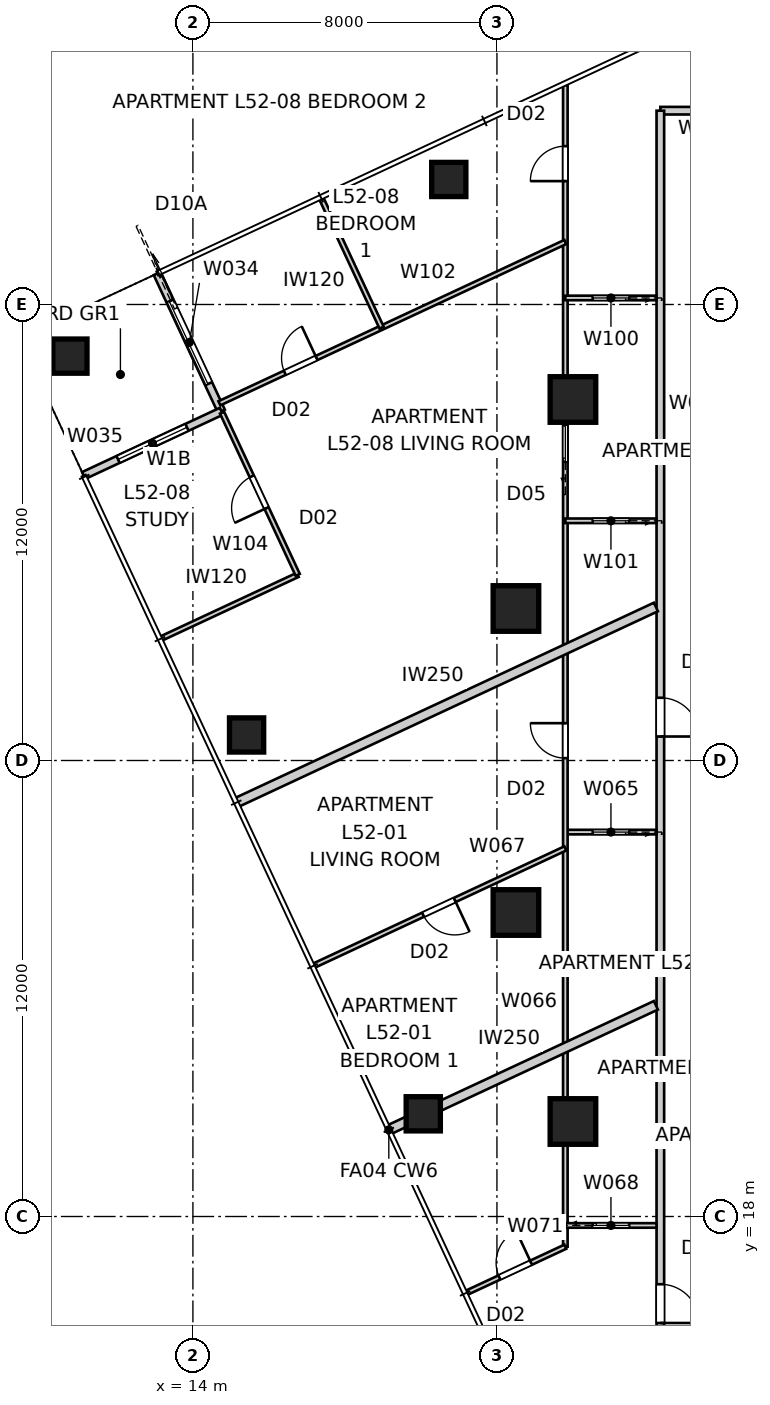
"""IFC4 building model, lengths in metres.
Left out: names, types, materials, properties, quantities, classifications, styles, units other than length and angle.
Written with IfcOpenShell. Run it as: python <this file> out.ifc"""

import sys

from ifc_helpers import new_model, si_unit, direction, frame, frame_2d, origin, origin_2d, place, context, subcontext, project, spatial, rectangle, extrude, element, fill, save


model = new_model("IFC4")
c1 = context("Model", 3, precision=1e-05, world=origin(), true_north=direction((0.0, 1.0)))
c2 = subcontext(c1, "Body", "Model", "MODEL_VIEW")
j1 = project(units=[si_unit("LENGTHUNIT", "METRE"), si_unit("PLANEANGLEUNIT", "RADIAN")], contexts=[c1])
p1 = place(None, origin())
s1 = spatial("IfcSite", under=j1, at=p1, CompositionType="ELEMENT")
p2 = place(p1, origin())
s2 = spatial("IfcBuilding", under=s1, at=p2, CompositionType="ELEMENT")
p3 = place(p2, frame((0.0, 0.0, 189.6)))
s3 = spatial("IfcBuildingStorey", under=s2, at=p3, CompositionType="ELEMENT", Elevation=189.6)
for number, where, z_axis, x_axis in (
    (1, (20.733, 45.29, 0.0), (0.0, 0.0, 1.0), (1.0, 0.0, 0.0)),
    (2, (10.764, 40.641, 0.0), (0.0, 0.0, 1.0), (1.0, 0.0, 0.0)),
    (3, (15.412, 30.672, 0.0), (0.0, 0.0, 1.0), (1.0, 0.0, 0.0)),
    (4, (20.061, 20.702, 0.0), (0.0, 0.0, 1.0), (1.0, 0.0, 0.0)),
):
    element("IfcColumn", number, at=place(p3, frame(where, z_axis=z_axis, x_axis=x_axis)), inside=s3, PredefinedType="COLUMN", context=c2, shape_type="SweptSolid", body=[
        extrude(rectangle(XDim=0.9, YDim=0.9, at=origin_2d()), origin(), (0.0, 0.0, 1.0), 3.4),
    ])
for number, where, z_axis, x_axis in (
    (5, (24.0, 39.5, 0.0), (0.0, 0.0, 1.0), (1.0, 0.0, 0.0)),
    (6, (22.5, 34.0, 0.0), (0.0, 0.0, 1.0), (1.0, 0.0, 0.0)),
    (7, (22.5, 26.0, 0.0), (0.0, 0.0, 1.0), (1.0, 0.0, 0.0)),
    (8, (24.0, 20.5, 0.0), (0.0, 0.0, 1.0), (1.0, 0.0, 0.0)),
):
    element("IfcColumn", number, at=place(p3, frame(where, z_axis=z_axis, x_axis=x_axis)), inside=s3, PredefinedType="COLUMN", context=c2, shape_type="SweptSolid", body=[
        extrude(rectangle(XDim=1.2, YDim=1.2, at=origin_2d()), origin(), (0.0, 0.0, 1.0), 3.4),
    ])
p4 = place(p3, frame((13.06, 42.815, 0.0), z_axis=(0.0, 0.0, 1.0), x_axis=(0.422658246362, -0.906289140828, 0.0)))
e9 = element("IfcWall", 9, at=p4, inside=s3, PredefinedType="SOLIDWALL", context=c2, shape_type="SweptSolid", body=[
    extrude(rectangle(XDim=4.0, YDim=0.2, at=frame_2d((2.0, 0.0))), origin(), (0.0, 0.0, 1.0), 3.25),
])
p5 = place(p4, frame((0.8, 0.0, 0.0)))
e10 = element("IfcOpeningElement", 10, at=p5, cuts=e9, PredefinedType="OPENING", context=c2, shape_type="SweptSolid", body=[
    extrude(rectangle(XDim=2.4, YDim=2.1, at=frame_2d((1.2, 1.05))), frame((0.0, 0.11, 0.0), z_axis=(0.0, -1.0, 0.0), x_axis=(1.0, 0.0, 0.0)), (0.0, 0.0, 1.0), 0.22),
])
p6 = place(p3, frame((14.75, 39.19, 0.0), z_axis=(0.0, 0.0, 1.0), x_axis=(-0.906289140828, -0.422658246362, 0.0)))
e11 = element("IfcWall", 11, at=p6, inside=s3, PredefinedType="SOLIDWALL", context=c2, shape_type="SweptSolid", body=[
    extrude(rectangle(XDim=4.0, YDim=0.2, at=frame_2d((2.0, 0.0))), origin(), (0.0, 0.0, 1.0), 3.25),
])
p7 = place(p6, frame((1.0, 0.0, 0.45)))
e12 = element("IfcOpeningElement", 12, at=p7, cuts=e11, PredefinedType="OPENING", context=c2, shape_type="SweptSolid", body=[
    extrude(rectangle(XDim=2.0, YDim=1.8, at=frame_2d((1.0, 0.9))), frame((0.0, 0.11, 0.0), z_axis=(0.0, -1.0, 0.0), x_axis=(1.0, 0.0, 0.0)), (0.0, 0.0, 1.0), 0.22),
])
p8 = place(p3, frame((33.692, 47.1, 0.0), z_axis=(0.0, 0.0, 1.0), x_axis=(-1.0, 0.0, 0.0)))
e13 = element("IfcWall", 13, at=p8, inside=s3, PredefinedType="PARTITIONING", context=c2, shape_type="SweptSolid", body=[
    extrude(rectangle(XDim=7.392, YDim=0.2, at=frame_2d((3.696, 0.0))), origin(), (0.0, 0.0, 1.0), 3.25),
])
p9 = place(p8, frame((3.957, 0.0, 0.0)))
e14 = element("IfcOpeningElement", 14, at=p9, cuts=e13, PredefinedType="OPENING", context=c2, shape_type="SweptSolid", body=[
    extrude(rectangle(XDim=1.02, YDim=2.34, at=frame_2d((0.51, 1.17))), frame((0.0, 0.11, 0.0), z_axis=(0.0, -1.0, 0.0), x_axis=(1.0, 0.0, 0.0)), (0.0, 0.0, 1.0), 0.22),
])
p10 = place(p3, frame((26.3, 47.1, 0.0), z_axis=(0.0, 0.0, 1.0), x_axis=(0.0, -1.0, 0.0)))
e15 = element("IfcWall", 15, at=p10, inside=s3, PredefinedType="PARTITIONING", context=c2, shape_type="SweptSolid", body=[
    extrude(rectangle(XDim=33.8, YDim=0.2, at=frame_2d((16.9, 0.0))), origin(), (0.0, 0.0, 1.0), 3.25),
])
p11 = place(p10, frame((15.449, 0.0, 0.0)))
e16 = element("IfcOpeningElement", 16, at=p11, cuts=e15, PredefinedType="OPENING", context=c2, shape_type="SweptSolid", body=[
    extrude(rectangle(XDim=1.02, YDim=2.34, at=frame_2d((0.51, 1.17))), frame((0.0, 0.11, 0.0), z_axis=(0.0, -1.0, 0.0), x_axis=(1.0, 0.0, 0.0)), (0.0, 0.0, 1.0), 0.22),
])
p12 = place(p10, frame((30.883, 0.0, 0.0)))
e17 = element("IfcOpeningElement", 17, at=p12, cuts=e15, PredefinedType="OPENING", context=c2, shape_type="SweptSolid", body=[
    extrude(rectangle(XDim=1.02, YDim=2.34, at=frame_2d((0.51, 1.17))), frame((0.0, 0.11, 0.0), z_axis=(0.0, -1.0, 0.0), x_axis=(1.0, 0.0, 0.0)), (0.0, 0.0, 1.0), 0.22),
])
p13 = place(p3, frame((19.155, 20.28, 0.0), z_axis=(0.0, 0.0, 1.0), x_axis=(0.906308569177, 0.422616584432, 0.0)))
e18 = element("IfcWall", 18, at=p13, inside=s3, PredefinedType="PARTITIONING", context=c2, shape_type="SweptSolid", body=[
    extrude(rectangle(XDim=7.755, YDim=0.25, at=frame_2d((3.877, 0.0))), origin(), (0.0, 0.0, 1.0), 3.25),
])
p14 = place(p3, frame((15.14, 28.89, 0.0), z_axis=(0.0, 0.0, 1.0), x_axis=(0.906303906082, 0.422626584374, 0.0)))
e19 = element("IfcWall", 19, at=p14, inside=s3, PredefinedType="PARTITIONING", context=c2, shape_type="SweptSolid", body=[
    extrude(rectangle(XDim=12.185, YDim=0.25, at=frame_2d((6.092, 0.0))), origin(), (0.0, 0.0, 1.0), 3.25),
])
p15 = place(p3, frame((26.2, 28.116, 0.0), z_axis=(0.0, 0.0, 1.0), x_axis=(-1.0, 0.0, 0.0)))
e20 = element("IfcWall", 20, at=p15, inside=s3, PredefinedType="PARTITIONING", context=c2, shape_type="SweptSolid", body=[
    extrude(rectangle(XDim=2.4, YDim=0.12, at=frame_2d((1.2, 0.0))), origin(), (0.0, 0.0, 1.0), 3.25),
])
p16 = place(p15, frame((0.72, 0.0, 0.0)))
e21 = element("IfcOpeningElement", 21, at=p16, cuts=e20, PredefinedType="OPENING", context=c2, shape_type="SweptSolid", body=[
    extrude(rectangle(XDim=0.96, YDim=2.1, at=frame_2d((0.48, 1.05))), frame((0.0, 0.07, 0.0), z_axis=(0.0, -1.0, 0.0), x_axis=(1.0, 0.0, 0.0)), (0.0, 0.0, 1.0), 0.14),
])
p17 = place(p3, frame((23.8, 17.205, 0.0), z_axis=(0.0, 0.0, 1.0), x_axis=(0.0, 1.0, 0.0)))
e22 = element("IfcWall", 22, at=p17, inside=s3, PredefinedType="PARTITIONING", context=c2, shape_type="SweptSolid", body=[
    extrude(rectangle(XDim=30.574, YDim=0.12, at=frame_2d((15.287, 0.0))), origin(), (0.0, 0.0, 1.0), 2.55),
])
p18 = place(p17, frame((12.857, 0.0, 0.0)))
e23 = element("IfcOpeningElement", 23, at=p18, cuts=e22, PredefinedType="OPENING", context=c2, shape_type="SweptSolid", body=[
    extrude(rectangle(XDim=0.92, YDim=2.34, at=frame_2d((0.46, 1.17))), frame((0.0, 0.07, 0.0), z_axis=(0.0, -1.0, 0.0), x_axis=(1.0, 0.0, 0.0)), (0.0, 0.0, 1.0), 0.14),
])
p19 = place(p17, frame((28.042, 0.0, 0.0)))
e24 = element("IfcOpeningElement", 24, at=p19, cuts=e22, PredefinedType="OPENING", context=c2, shape_type="SweptSolid", body=[
    extrude(rectangle(XDim=0.92, YDim=2.34, at=frame_2d((0.46, 1.17))), frame((0.0, 0.07, 0.0), z_axis=(0.0, -1.0, 0.0), x_axis=(1.0, 0.0, 0.0)), (0.0, 0.0, 1.0), 0.14),
])
p20 = place(p17, frame((20.655, 0.0, 0.0)))
e25 = element("IfcOpeningElement", 25, at=p20, cuts=e22, PredefinedType="OPENING", context=c2, shape_type="SweptSolid", body=[
    extrude(rectangle(XDim=0.96, YDim=2.1, at=frame_2d((0.48, 1.05))), frame((0.0, 0.07, 0.0), z_axis=(0.0, -1.0, 0.0), x_axis=(1.0, 0.0, 0.0)), (0.0, 0.0, 1.0), 0.14),
])
p21 = place(p3, frame((23.8, 27.687, 0.0), z_axis=(0.0, 0.0, 1.0), x_axis=(-0.906306986906, -0.422619977621, 0.0)))
e26 = element("IfcWall", 26, at=p21, inside=s3, PredefinedType="PARTITIONING", context=c2, shape_type="SweptSolid", body=[
    extrude(rectangle(XDim=7.3, YDim=0.12, at=frame_2d((3.65, 0.0))), origin(), (0.0, 0.0, 1.0), 3.25),
])
p22 = place(p21, frame((3.21, 0.0, 0.0)))
e27 = element("IfcOpeningElement", 27, at=p22, cuts=e26, PredefinedType="OPENING", context=c2, shape_type="SweptSolid", body=[
    extrude(rectangle(XDim=0.92, YDim=2.34, at=frame_2d((0.46, 1.17))), frame((0.0, 0.07, 0.0), z_axis=(0.0, -1.0, 0.0), x_axis=(1.0, 0.0, 0.0)), (0.0, 0.0, 1.0), 0.14),
])
p23 = place(p3, frame((23.8, 17.765, 0.0), z_axis=(0.0, 0.0, 1.0), x_axis=(1.0, 0.0, 0.0)))
e28 = element("IfcWall", 28, at=p23, inside=s3, PredefinedType="PARTITIONING", context=c2, shape_type="SweptSolid", body=[
    extrude(rectangle(XDim=2.4, YDim=0.12, at=frame_2d((1.2, 0.0))), origin(), (0.0, 0.0, 1.0), 3.25),
])
p24 = place(p23, frame((0.72, 0.0, 0.0)))
e29 = element("IfcOpeningElement", 29, at=p24, cuts=e28, PredefinedType="OPENING", context=c2, shape_type="SweptSolid", body=[
    extrude(rectangle(XDim=0.96, YDim=2.1, at=frame_2d((0.48, 1.05))), frame((0.0, 0.07, 0.0), z_axis=(0.0, -1.0, 0.0), x_axis=(1.0, 0.0, 0.0)), (0.0, 0.0, 1.0), 0.14),
])
p25 = place(p3, frame((21.199, 15.992, 0.0), z_axis=(0.0, 0.0, 1.0), x_axis=(0.906291760669, 0.422652628697, 0.0)))
e30 = element("IfcWall", 30, at=p25, inside=s3, PredefinedType="PARTITIONING", context=c2, shape_type="SweptSolid", body=[
    extrude(rectangle(XDim=2.87, YDim=0.12, at=frame_2d((1.435, 0.0))), origin(), (0.0, 0.0, 1.0), 3.25),
])
p26 = place(p25, frame((0.955, 0.0, 0.0)))
e31 = element("IfcOpeningElement", 31, at=p26, cuts=e30, PredefinedType="OPENING", context=c2, shape_type="SweptSolid", body=[
    extrude(rectangle(XDim=0.92, YDim=2.34, at=frame_2d((0.46, 1.17))), frame((0.0, 0.07, 0.0), z_axis=(0.0, -1.0, 0.0), x_axis=(1.0, 0.0, 0.0)), (0.0, 0.0, 1.0), 0.14),
])
p27 = place(p3, frame((26.2, 42.172, 0.0), z_axis=(0.0, 0.0, 1.0), x_axis=(-1.0, 0.0, 0.0)))
e32 = element("IfcWall", 32, at=p27, inside=s3, PredefinedType="PARTITIONING", context=c2, shape_type="SweptSolid", body=[
    extrude(rectangle(XDim=2.4, YDim=0.12, at=frame_2d((1.2, 0.0))), origin(), (0.0, 0.0, 1.0), 3.25),
])
p28 = place(p27, frame((0.72, 0.0, 0.0)))
e33 = element("IfcOpeningElement", 33, at=p28, cuts=e32, PredefinedType="OPENING", context=c2, shape_type="SweptSolid", body=[
    extrude(rectangle(XDim=0.96, YDim=2.1, at=frame_2d((0.48, 1.05))), frame((0.0, 0.07, 0.0), z_axis=(0.0, -1.0, 0.0), x_axis=(1.0, 0.0, 0.0)), (0.0, 0.0, 1.0), 0.14),
])
p29 = place(p3, frame((26.2, 36.308, 0.0), z_axis=(0.0, 0.0, 1.0), x_axis=(-1.0, 0.0, 0.0)))
e34 = element("IfcWall", 34, at=p29, inside=s3, PredefinedType="PARTITIONING", context=c2, shape_type="SweptSolid", body=[
    extrude(rectangle(XDim=2.4, YDim=0.12, at=frame_2d((1.2, 0.0))), origin(), (0.0, 0.0, 1.0), 3.25),
])
p30 = place(p29, frame((0.72, 0.0, 0.0)))
e35 = element("IfcOpeningElement", 35, at=p30, cuts=e34, PredefinedType="OPENING", context=c2, shape_type="SweptSolid", body=[
    extrude(rectangle(XDim=0.96, YDim=2.1, at=frame_2d((0.48, 1.05))), frame((0.0, 0.07, 0.0), z_axis=(0.0, -1.0, 0.0), x_axis=(1.0, 0.0, 0.0)), (0.0, 0.0, 1.0), 0.14),
])
p31 = place(p3, frame((14.697, 39.4, 0.0), z_axis=(0.0, 0.0, 1.0), x_axis=(0.906300466163, 0.422633961049, 0.0)))
e36 = element("IfcWall", 36, at=p31, inside=s3, PredefinedType="PARTITIONING", context=c2, shape_type="SweptSolid", body=[
    extrude(rectangle(XDim=10.044, YDim=0.12, at=frame_2d((5.022, 0.0))), origin(), (0.0, 0.0, 1.0), 3.25),
])
p32 = place(p31, frame((1.9, 0.0, 0.0)))
e37 = element("IfcOpeningElement", 37, at=p32, cuts=e36, PredefinedType="OPENING", context=c2, shape_type="SweptSolid", body=[
    extrude(rectangle(XDim=0.92, YDim=2.34, at=frame_2d((0.46, 1.17))), frame((0.0, 0.07, 0.0), z_axis=(0.0, -1.0, 0.0), x_axis=(1.0, 0.0, 0.0)), (0.0, 0.0, 1.0), 0.14),
])
p33 = place(p3, frame((13.169, 33.211, 0.0), z_axis=(0.0, 0.0, 1.0), x_axis=(0.906277619727, 0.422682949718, 0.0)))
e38 = element("IfcWall", 38, at=p33, inside=s3, PredefinedType="PARTITIONING", context=c2, shape_type="SweptSolid", body=[
    extrude(rectangle(XDim=3.96, YDim=0.12, at=frame_2d((1.98, 0.0))), origin(), (0.0, 0.0, 1.0), 3.25),
])
p34 = place(p3, frame((16.758, 34.885, 0.0), z_axis=(0.0, 0.0, 1.0), x_axis=(-0.422621536194, 0.906306260127, 0.0)))
e39 = element("IfcWall", 39, at=p34, inside=s3, PredefinedType="PARTITIONING", context=c2, shape_type="SweptSolid", body=[
    extrude(rectangle(XDim=4.71, YDim=0.12, at=frame_2d((2.355, 0.0))), origin(), (0.0, 0.0, 1.0), 3.25),
])
p35 = place(p34, frame((1.94, 0.0, 0.0)))
e40 = element("IfcOpeningElement", 40, at=p35, cuts=e39, PredefinedType="OPENING", context=c2, shape_type="SweptSolid", body=[
    extrude(rectangle(XDim=0.92, YDim=2.34, at=frame_2d((0.46, 1.17))), frame((0.0, 0.07, 0.0), z_axis=(0.0, -1.0, 0.0), x_axis=(1.0, 0.0, 0.0)), (0.0, 0.0, 1.0), 0.14),
])
p36 = place(p3, frame((18.965, 41.391, 0.0), z_axis=(0.0, 0.0, 1.0), x_axis=(-0.422600090785, 0.906316260071, 0.0)))
e41 = element("IfcWall", 41, at=p36, inside=s3, PredefinedType="PARTITIONING", context=c2, shape_type="SweptSolid", body=[
    extrude(rectangle(XDim=3.747, YDim=0.12, at=frame_2d((1.874, 0.0))), origin(), (0.0, 0.0, 1.0), 3.25),
])
p37 = place(p5, origin())
e42 = element("IfcDoor", 42, at=p37, inside=s3, OperationType="SLIDING_TO_LEFT", PredefinedType="DOOR", context=c2, shape_type="SweptSolid", body=[
    extrude(rectangle(XDim=2.4, YDim=2.1, at=frame_2d((1.2, 1.05))), frame((0.0, 0.025, 0.0), z_axis=(0.0, -1.0, 0.0), x_axis=(1.0, 0.0, 0.0)), (0.0, 0.0, 1.0), 0.05),
])
fill(e10, e42)
p38 = place(p7, origin())
e43 = element("IfcWindow", 43, at=p38, inside=s3, PartitioningType="SINGLE_PANEL", PredefinedType="WINDOW", context=c2, shape_type="SweptSolid", body=[
    extrude(rectangle(XDim=2.0, YDim=1.8, at=frame_2d((1.0, 0.9))), frame((0.0, 0.03, 0.0), z_axis=(0.0, -1.0, 0.0), x_axis=(1.0, 0.0, 0.0)), (0.0, 0.0, 1.0), 0.06),
])
fill(e12, e43)
p39 = place(p11, origin())
e44 = element("IfcDoor", 44, at=p39, inside=s3, OperationType="SINGLE_SWING_RIGHT", PredefinedType="DOOR", context=c2, shape_type="SweptSolid", body=[
    extrude(rectangle(XDim=1.02, YDim=2.34, at=frame_2d((0.51, 1.17))), frame((0.0, 0.025, 0.0), z_axis=(0.0, -1.0, 0.0), x_axis=(1.0, 0.0, 0.0)), (0.0, 0.0, 1.0), 0.05),
])
fill(e16, e44)
p40 = place(p12, origin())
e45 = element("IfcDoor", 45, at=p40, inside=s3, OperationType="SINGLE_SWING_RIGHT", PredefinedType="DOOR", context=c2, shape_type="SweptSolid", body=[
    extrude(rectangle(XDim=1.02, YDim=2.34, at=frame_2d((0.51, 1.17))), frame((0.0, 0.025, 0.0), z_axis=(0.0, -1.0, 0.0), x_axis=(1.0, 0.0, 0.0)), (0.0, 0.0, 1.0), 0.05),
])
fill(e17, e45)
p41 = place(p18, origin())
e46 = element("IfcDoor", 46, at=p41, inside=s3, OperationType="SINGLE_SWING_RIGHT", PredefinedType="DOOR", context=c2, shape_type="SweptSolid", body=[
    extrude(rectangle(XDim=0.92, YDim=2.34, at=frame_2d((0.46, 1.17))), frame((0.0, 0.025, 0.0), z_axis=(0.0, -1.0, 0.0), x_axis=(1.0, 0.0, 0.0)), (0.0, 0.0, 1.0), 0.05),
])
fill(e23, e46)
p42 = place(p16, origin())
e47 = element("IfcDoor", 47, at=p42, inside=s3, OperationType="SLIDING_TO_LEFT", PredefinedType="DOOR", context=c2, shape_type="SweptSolid", body=[
    extrude(rectangle(XDim=0.96, YDim=2.1, at=frame_2d((0.48, 1.05))), frame((0.0, 0.025, 0.0), z_axis=(0.0, -1.0, 0.0), x_axis=(1.0, 0.0, 0.0)), (0.0, 0.0, 1.0), 0.05),
])
fill(e21, e47)
p43 = place(p19, origin())
e48 = element("IfcDoor", 48, at=p43, inside=s3, OperationType="SINGLE_SWING_LEFT", PredefinedType="DOOR", context=c2, shape_type="SweptSolid", body=[
    extrude(rectangle(XDim=0.92, YDim=2.34, at=frame_2d((0.46, 1.17))), frame((0.0, 0.025, 0.0), z_axis=(0.0, -1.0, 0.0), x_axis=(1.0, 0.0, 0.0)), (0.0, 0.0, 1.0), 0.05),
])
fill(e24, e48)
p44 = place(p28, origin())
e49 = element("IfcDoor", 49, at=p44, inside=s3, OperationType="SLIDING_TO_LEFT", PredefinedType="DOOR", context=c2, shape_type="SweptSolid", body=[
    extrude(rectangle(XDim=0.96, YDim=2.1, at=frame_2d((0.48, 1.05))), frame((0.0, 0.025, 0.0), z_axis=(0.0, -1.0, 0.0), x_axis=(1.0, 0.0, 0.0)), (0.0, 0.0, 1.0), 0.05),
])
fill(e33, e49)
p45 = place(p26, origin())
e50 = element("IfcDoor", 50, at=p45, inside=s3, OperationType="SINGLE_SWING_RIGHT", PredefinedType="DOOR", context=c2, shape_type="SweptSolid", body=[
    extrude(rectangle(XDim=0.92, YDim=2.34, at=frame_2d((0.46, 1.17))), frame((0.0, 0.025, 0.0), z_axis=(0.0, -1.0, 0.0), x_axis=(1.0, 0.0, 0.0)), (0.0, 0.0, 1.0), 0.05),
])
fill(e31, e50)
p46 = place(p24, origin())
e51 = element("IfcDoor", 51, at=p46, inside=s3, OperationType="SLIDING_TO_LEFT", PredefinedType="DOOR", context=c2, shape_type="SweptSolid", body=[
    extrude(rectangle(XDim=0.96, YDim=2.1, at=frame_2d((0.48, 1.05))), frame((0.0, 0.025, 0.0), z_axis=(0.0, -1.0, 0.0), x_axis=(1.0, 0.0, 0.0)), (0.0, 0.0, 1.0), 0.05),
])
fill(e29, e51)
p47 = place(p22, origin())
e52 = element("IfcDoor", 52, at=p47, inside=s3, OperationType="SINGLE_SWING_LEFT", PredefinedType="DOOR", context=c2, shape_type="SweptSolid", body=[
    extrude(rectangle(XDim=0.92, YDim=2.34, at=frame_2d((0.46, 1.17))), frame((0.0, 0.025, 0.0), z_axis=(0.0, -1.0, 0.0), x_axis=(1.0, 0.0, 0.0)), (0.0, 0.0, 1.0), 0.05),
])
fill(e27, e52)
p48 = place(p20, origin())
e53 = element("IfcDoor", 53, at=p48, inside=s3, OperationType="SLIDING_TO_LEFT", PredefinedType="DOOR", context=c2, shape_type="SweptSolid", body=[
    extrude(rectangle(XDim=0.96, YDim=2.1, at=frame_2d((0.48, 1.05))), frame((0.0, 0.025, 0.0), z_axis=(0.0, -1.0, 0.0), x_axis=(1.0, 0.0, 0.0)), (0.0, 0.0, 1.0), 0.05),
])
fill(e25, e53)
p49 = place(p30, origin())
e54 = element("IfcDoor", 54, at=p49, inside=s3, OperationType="SLIDING_TO_LEFT", PredefinedType="DOOR", context=c2, shape_type="SweptSolid", body=[
    extrude(rectangle(XDim=0.96, YDim=2.1, at=frame_2d((0.48, 1.05))), frame((0.0, 0.025, 0.0), z_axis=(0.0, -1.0, 0.0), x_axis=(1.0, 0.0, 0.0)), (0.0, 0.0, 1.0), 0.05),
])
fill(e35, e54)
p50 = place(p32, origin())
e55 = element("IfcDoor", 55, at=p50, inside=s3, OperationType="SINGLE_SWING_RIGHT", PredefinedType="DOOR", context=c2, shape_type="SweptSolid", body=[
    extrude(rectangle(XDim=0.92, YDim=2.34, at=frame_2d((0.46, 1.17))), frame((0.0, 0.025, 0.0), z_axis=(0.0, -1.0, 0.0), x_axis=(1.0, 0.0, 0.0)), (0.0, 0.0, 1.0), 0.05),
])
fill(e37, e55)
p51 = place(p35, origin())
e56 = element("IfcDoor", 56, at=p51, inside=s3, OperationType="SINGLE_SWING_LEFT", PredefinedType="DOOR", context=c2, shape_type="SweptSolid", body=[
    extrude(rectangle(XDim=0.92, YDim=2.34, at=frame_2d((0.46, 1.17))), frame((0.0, 0.025, 0.0), z_axis=(0.0, -1.0, 0.0), x_axis=(1.0, 0.0, 0.0)), (0.0, 0.0, 1.0), 0.05),
])
fill(e40, e56)
save(model, sys.argv[1])
